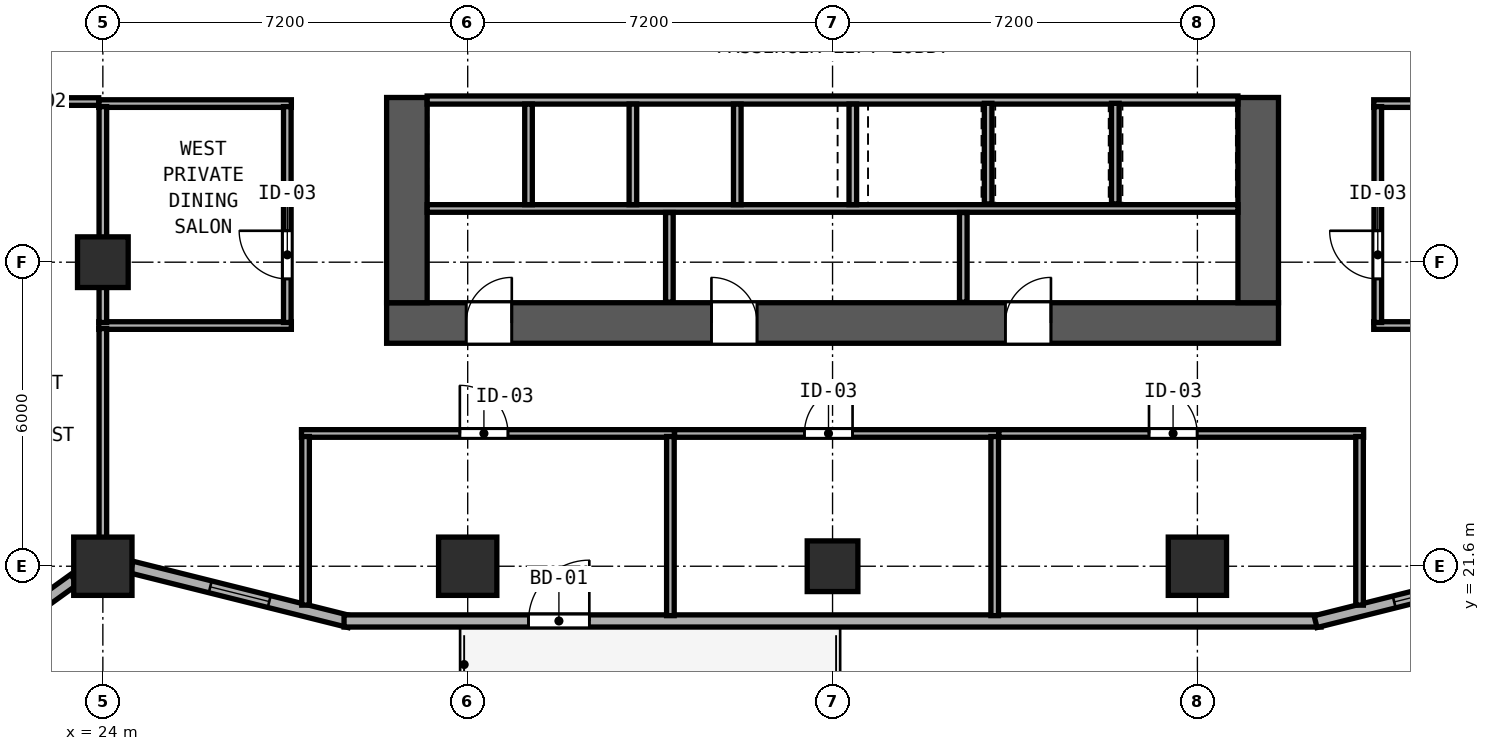
"""IFC4 building model, lengths in metres.
Left out: names, types, materials, properties, quantities, classifications, styles, units other than length and angle.
Written with IfcOpenShell. Run it as: python <this file> out.ifc"""

import sys

from ifc_helpers import new_model, si_unit, direction, frame, frame_2d, origin, origin_2d, place, context, subcontext, project, spatial, rectangle, hollow_rectangle, extrude, element, fill, save


model = new_model("IFC4")
c1 = context("Model", 3, precision=1e-05, world=origin(), true_north=direction((0.0, 1.0)))
c2 = subcontext(c1, "Body", "Model", "MODEL_VIEW")
j1 = project(units=[si_unit("LENGTHUNIT", "METRE"), si_unit("PLANEANGLEUNIT", "RADIAN")], contexts=[c1])
p1 = place(None, origin())
s1 = spatial("IfcSite", under=j1, at=p1, CompositionType="ELEMENT")
p2 = place(p1, origin())
s2 = spatial("IfcBuilding", under=s1, at=p2, CompositionType="ELEMENT")
p3 = place(p2, frame((0.0, 0.0, 78.0)))
s3 = spatial("IfcBuildingStorey", under=s2, at=p3, CompositionType="ELEMENT", Elevation=78.0)
p4 = place(p3, frame((29.6, 26.4, 0.0), z_axis=(0.0, 0.0, 1.0), x_axis=(1.0, 0.0, 0.0)))
e1 = element("IfcWall", 1, at=p4, inside=s3, PredefinedType="SHEAR", context=c2, shape_type="SweptSolid", body=[
    extrude(rectangle(XDim=17.6, YDim=0.8, at=frame_2d((8.8, 0.0))), origin(), (0.0, 0.0, 1.0), 3.6),
])
p5 = place(p4, frame((2.47, 0.0, 0.0), z_axis=(0.0, 0.0, 1.0), x_axis=(-1.0, 0.0, 0.0)))
e2 = element("IfcOpeningElement", 2, at=p5, cuts=e1, PredefinedType="OPENING", context=c2, shape_type="SweptSolid", body=[
    extrude(rectangle(XDim=0.9, YDim=2.1, at=frame_2d((0.45, 1.05))), frame((0.0, 0.41, 0.0), z_axis=(0.0, -1.0, 0.0), x_axis=(1.0, 0.0, 0.0)), (0.0, 0.0, 1.0), 0.82),
])
p6 = place(p4, frame((7.31, 0.0, 0.0), z_axis=(0.0, 0.0, 1.0), x_axis=(-1.0, 0.0, 0.0)))
e3 = element("IfcOpeningElement", 3, at=p6, cuts=e1, PredefinedType="OPENING", context=c2, shape_type="SweptSolid", body=[
    extrude(rectangle(XDim=0.9, YDim=2.1, at=frame_2d((0.45, 1.05))), frame((0.0, 0.41, 0.0), z_axis=(0.0, -1.0, 0.0), x_axis=(1.0, 0.0, 0.0)), (0.0, 0.0, 1.0), 0.82),
])
p7 = place(p4, frame((13.11, 0.0, 0.0), z_axis=(0.0, 0.0, 1.0), x_axis=(-1.0, 0.0, 0.0)))
e4 = element("IfcOpeningElement", 4, at=p7, cuts=e1, PredefinedType="OPENING", context=c2, shape_type="SweptSolid", body=[
    extrude(rectangle(XDim=0.9, YDim=2.1, at=frame_2d((0.45, 1.05))), frame((0.0, 0.41, 0.0), z_axis=(0.0, -1.0, 0.0), x_axis=(1.0, 0.0, 0.0)), (0.0, 0.0, 1.0), 0.82),
])
for number, where, z_axis, x_axis in (
    (5, (30.0, 26.8, 0.0), (0.0, 0.0, 1.0), (0.0, 1.0, 0.0)),
    (6, (46.8, 26.8, 0.0), (0.0, 0.0, 1.0), (0.0, 1.0, 0.0)),
):
    element("IfcWall", number, at=place(p3, frame(where, z_axis=z_axis, x_axis=x_axis)), inside=s3, PredefinedType="SHEAR", context=c2, shape_type="SweptSolid", body=[
        extrude(rectangle(XDim=4.05, YDim=0.8, at=frame_2d((2.025, 0.0))), origin(), (0.0, 0.0, 1.0), 3.6),
    ])
for number, where, z_axis, x_axis in (
    (7, (24.0, 21.6, 0.0), (0.0, 0.0, 1.0), (1.0, 0.0, 0.0)),
    (8, (31.2, 21.6, 0.0), (0.0, 0.0, 1.0), (1.0, 0.0, 0.0)),
    (9, (45.6, 21.6, 0.0), (0.0, 0.0, 1.0), (1.0, 0.0, 0.0)),
):
    element("IfcColumn", number, at=place(p3, frame(where, z_axis=z_axis, x_axis=x_axis)), inside=s3, PredefinedType="COLUMN", context=c2, shape_type="SweptSolid", body=[
        extrude(hollow_rectangle(XDim=1.15, YDim=1.15, WallThickness=0.042, at=origin_2d()), origin(), (0.0, 0.0, 1.0), 3.8),
    ])
for number, where, z_axis, x_axis in (
    (10, (24.0, 27.6, 0.0), (0.0, 0.0, 1.0), (1.0, 0.0, 0.0)),
    (11, (38.4, 21.6, 0.0), (0.0, 0.0, 1.0), (1.0, 0.0, 0.0)),
):
    element("IfcColumn", number, at=place(p3, frame(where, z_axis=z_axis, x_axis=x_axis)), inside=s3, PredefinedType="COLUMN", context=c2, shape_type="SweptSolid", body=[
        extrude(hollow_rectangle(XDim=1.0, YDim=1.0, WallThickness=0.038, at=origin_2d()), origin(), (0.0, 0.0, 1.0), 3.8),
    ])
p8 = place(p3, frame((14.075, 14.602, 0.0), z_axis=(0.0, 0.0, 1.0), x_axis=(0.811543176492, 0.58429245476, 0.0)))
e12 = element("IfcWall", 12, at=p8, inside=s3, PredefinedType="SOLIDWALL", context=c2, shape_type="SweptSolid", body=[
    extrude(rectangle(XDim=11.531, YDim=0.24, at=frame_2d((5.765, 0.0))), origin(), (0.0, 0.0, 1.0), 3.097),
])
p9 = place(p8, frame((1.246, 0.0, 0.85)))
e13 = element("IfcOpeningElement", 13, at=p9, cuts=e12, PredefinedType="OPENING", context=c2, shape_type="SweptSolid", body=[
    extrude(rectangle(XDim=1.2, YDim=1.85, at=frame_2d((0.6, 0.925))), frame((0.0, 0.13, 0.0), z_axis=(0.0, -1.0, 0.0), x_axis=(1.0, 0.0, 0.0)), (0.0, 0.0, 1.0), 0.26),
])
p10 = place(p8, frame((6.36, 0.0, 0.85)))
e14 = element("IfcOpeningElement", 14, at=p10, cuts=e12, PredefinedType="OPENING", context=c2, shape_type="SweptSolid", body=[
    extrude(rectangle(XDim=1.2, YDim=1.85, at=frame_2d((0.6, 0.925))), frame((0.0, 0.13, 0.0), z_axis=(0.0, -1.0, 0.0), x_axis=(1.0, 0.0, 0.0)), (0.0, 0.0, 1.0), 0.26),
])
p11 = place(p8, frame((9.07, 0.0, 0.85)))
e15 = element("IfcOpeningElement", 15, at=p11, cuts=e12, PredefinedType="OPENING", context=c2, shape_type="SweptSolid", body=[
    extrude(rectangle(XDim=1.2, YDim=1.85, at=frame_2d((0.6, 0.925))), frame((0.0, 0.13, 0.0), z_axis=(0.0, -1.0, 0.0), x_axis=(1.0, 0.0, 0.0)), (0.0, 0.0, 1.0), 0.26),
])
p12 = place(p3, frame((24.567, 21.582, 0.0), z_axis=(0.0, 0.0, 1.0), x_axis=(0.970148978127, -0.24250971164, 0.0)))
e16 = element("IfcWall", 16, at=p12, inside=s3, PredefinedType="SOLIDWALL", context=c2, shape_type="SweptSolid", body=[
    extrude(rectangle(XDim=4.434, YDim=0.24, at=frame_2d((2.217, 0.0))), origin(), (0.0, 0.0, 1.0), 3.097),
])
p13 = place(p12, frame((1.6, 0.0, 0.85)))
e17 = element("IfcOpeningElement", 17, at=p13, cuts=e16, PredefinedType="OPENING", context=c2, shape_type="SweptSolid", body=[
    extrude(rectangle(XDim=1.2, YDim=1.85, at=frame_2d((0.6, 0.925))), frame((0.0, 0.13, 0.0), z_axis=(0.0, -1.0, 0.0), x_axis=(1.0, 0.0, 0.0)), (0.0, 0.0, 1.0), 0.26),
])
p14 = place(p3, frame((28.76, 20.52, 0.0), z_axis=(0.0, 0.0, 1.0), x_axis=(1.0, 0.0, 0.0)))
e18 = element("IfcWall", 18, at=p14, inside=s3, PredefinedType="SOLIDWALL", context=c2, shape_type="SweptSolid", body=[
    extrude(rectangle(XDim=19.281, YDim=0.24, at=frame_2d((9.64, 0.0))), origin(), (0.0, 0.0, 1.0), 3.6),
])
p15 = place(p14, frame((4.84, 0.0, 0.0), z_axis=(0.0, 0.0, 1.0), x_axis=(-1.0, 0.0, 0.0)))
e19 = element("IfcOpeningElement", 19, at=p15, cuts=e18, PredefinedType="OPENING", context=c2, shape_type="SweptSolid", body=[
    extrude(rectangle(XDim=1.2, YDim=2.15, at=frame_2d((0.6, 1.075))), frame((0.0, 0.13, 0.0), z_axis=(0.0, -1.0, 0.0), x_axis=(1.0, 0.0, 0.0)), (0.0, 0.0, 1.0), 0.26),
])
p16 = place(p3, frame((47.932, 20.507, 0.0), z_axis=(0.0, 0.0, 1.0), x_axis=(0.970145739396, 0.242522667667, 0.0)))
e20 = element("IfcWall", 20, at=p16, inside=s3, PredefinedType="SOLIDWALL", context=c2, shape_type="SweptSolid", body=[
    extrude(rectangle(XDim=4.433, YDim=0.24, at=frame_2d((2.217, 0.0))), origin(), (0.0, 0.0, 1.0), 3.097),
])
p17 = place(p16, frame((1.6, 0.0, 0.85)))
e21 = element("IfcOpeningElement", 21, at=p17, cuts=e20, PredefinedType="OPENING", context=c2, shape_type="SweptSolid", body=[
    extrude(rectangle(XDim=1.2, YDim=1.85, at=frame_2d((0.6, 0.925))), frame((0.0, 0.13, 0.0), z_axis=(0.0, -1.0, 0.0), x_axis=(1.0, 0.0, 0.0)), (0.0, 0.0, 1.0), 0.26),
])
p18 = place(p3, frame((30.4, 30.8, 0.0), z_axis=(0.0, 0.0, 1.0), x_axis=(1.0, 0.0, 0.0)))
e22 = element("IfcWall", 22, at=p18, inside=s3, PredefinedType="SOLIDWALL", context=c2, shape_type="SweptSolid", body=[
    extrude(rectangle(XDim=16.0, YDim=0.16, at=frame_2d((8.0, 0.0))), origin(), (0.0, 0.0, 1.0), 3.6),
])
p19 = place(p3, frame((30.4, 28.66, 0.0), z_axis=(0.0, 0.0, 1.0), x_axis=(1.0, 0.0, 0.0)))
e23 = element("IfcWall", 23, at=p19, inside=s3, PredefinedType="PARTITIONING", context=c2, shape_type="SweptSolid", body=[
    extrude(rectangle(XDim=16.0, YDim=0.15, at=frame_2d((8.0, 0.0))), origin(), (0.0, 0.0, 1.0), 3.6),
])
for number, where, z_axis, x_axis in (
    (24, (32.4, 28.735, 0.0), (0.0, 0.0, 1.0), (0.0, 1.0, 0.0)),
    (25, (34.46, 28.735, 0.0), (0.0, 0.0, 1.0), (0.0, 1.0, 0.0)),
    (26, (36.52, 28.735, 0.0), (0.0, 0.0, 1.0), (0.0, 1.0, 0.0)),
    (27, (38.8, 28.735, 0.0), (0.0, 0.0, 1.0), (0.0, 1.0, 0.0)),
):
    element("IfcWall", number, at=place(p3, frame(where, z_axis=z_axis, x_axis=x_axis)), inside=s3, PredefinedType="SOLIDWALL", context=c2, shape_type="SweptSolid", body=[
        extrude(rectangle(XDim=1.985, YDim=0.15, at=frame_2d((0.992, 0.0))), origin(), (0.0, 0.0, 1.0), 3.6),
    ])
for number, where, z_axis, x_axis in (
    (28, (35.18, 26.81, 0.0), (0.0, 0.0, 1.0), (0.0, 1.0, 0.0)),
    (29, (40.98, 26.81, 0.0), (0.0, 0.0, 1.0), (0.0, 1.0, 0.0)),
):
    element("IfcWall", number, at=place(p3, frame(where, z_axis=z_axis, x_axis=x_axis)), inside=s3, PredefinedType="PARTITIONING", context=c2, shape_type="SweptSolid", body=[
        extrude(rectangle(XDim=1.77, YDim=0.15, at=frame_2d((0.885, 0.0))), origin(), (0.0, 0.0, 1.0), 3.6),
    ])
for number, where, z_axis, x_axis in (
    (30, (41.47, 28.75, 0.0), (0.0, 0.0, 1.0), (0.0, 1.0, 0.0)),
    (31, (43.98, 28.75, 0.0), (0.0, 0.0, 1.0), (0.0, 1.0, 0.0)),
):
    element("IfcWall", number, at=place(p3, frame(where, z_axis=z_axis, x_axis=x_axis)), inside=s3, PredefinedType="SOLIDWALL", context=c2, shape_type="SweptSolid", body=[
        extrude(rectangle(XDim=1.985, YDim=0.15, at=frame_2d((0.993, 0.0))), origin(), (0.0, 0.0, 1.0), 3.6),
    ])
for number, where, z_axis, x_axis in (
    (32, (23.92, 30.73, 0.0), (0.0, 0.0, 1.0), (1.0, 0.0, 0.0)),
    (33, (23.92, 26.35, 0.0), (0.0, 0.0, 1.0), (1.0, 0.0, 0.0)),
):
    element("IfcWall", number, at=place(p3, frame(where, z_axis=z_axis, x_axis=x_axis)), inside=s3, PredefinedType="PARTITIONING", context=c2, shape_type="SweptSolid", body=[
        extrude(rectangle(XDim=3.8, YDim=0.15, at=frame_2d((1.9, 0.0))), origin(), (0.0, 0.0, 1.0), 3.6),
    ])
p20 = place(p3, frame((24.0, 26.41, 0.0), z_axis=(0.0, 0.0, 1.0), x_axis=(0.0, 1.0, 0.0)))
e34 = element("IfcWall", 34, at=p20, inside=s3, PredefinedType="PARTITIONING", context=c2, shape_type="SweptSolid", body=[
    extrude(rectangle(XDim=4.26, YDim=0.15, at=frame_2d((2.13, 0.0))), origin(), (0.0, 0.0, 1.0), 3.097),
])
p21 = place(p3, frame((27.64, 26.41, 0.0), z_axis=(0.0, 0.0, 1.0), x_axis=(0.0, 1.0, 0.0)))
e35 = element("IfcWall", 35, at=p21, inside=s3, PredefinedType="PARTITIONING", context=c2, shape_type="SweptSolid", body=[
    extrude(rectangle(XDim=4.26, YDim=0.15, at=frame_2d((2.13, 0.0))), origin(), (0.0, 0.0, 1.0), 3.6),
])
p22 = place(p21, frame((1.81, 0.0, 0.0), z_axis=(0.0, 0.0, 1.0), x_axis=(-1.0, 0.0, 0.0)))
e36 = element("IfcOpeningElement", 36, at=p22, cuts=e35, PredefinedType="OPENING", context=c2, shape_type="SweptSolid", body=[
    extrude(rectangle(XDim=0.95, YDim=2.12, at=frame_2d((0.475, 1.06))), frame((0.0, 0.085, 0.0), z_axis=(0.0, -1.0, 0.0), x_axis=(1.0, 0.0, 0.0)), (0.0, 0.0, 1.0), 0.17),
])
for number, where, z_axis, x_axis in (
    (37, (49.08, 30.73, 0.0), (0.0, 0.0, 1.0), (1.0, 0.0, 0.0)),
    (38, (49.08, 26.35, 0.0), (0.0, 0.0, 1.0), (1.0, 0.0, 0.0)),
):
    element("IfcWall", number, at=place(p3, frame(where, z_axis=z_axis, x_axis=x_axis)), inside=s3, PredefinedType="PARTITIONING", context=c2, shape_type="SweptSolid", body=[
        extrude(rectangle(XDim=3.8, YDim=0.15, at=frame_2d((1.9, 0.0))), origin(), (0.0, 0.0, 1.0), 3.6),
    ])
p23 = place(p3, frame((49.16, 26.41, 0.0), z_axis=(0.0, 0.0, 1.0), x_axis=(0.0, 1.0, 0.0)))
e39 = element("IfcWall", 39, at=p23, inside=s3, PredefinedType="PARTITIONING", context=c2, shape_type="SweptSolid", body=[
    extrude(rectangle(XDim=4.26, YDim=0.15, at=frame_2d((2.13, 0.0))), origin(), (0.0, 0.0, 1.0), 3.6),
])
p24 = place(p23, frame((0.86, 0.0, 0.0)))
e40 = element("IfcOpeningElement", 40, at=p24, cuts=e39, PredefinedType="OPENING", context=c2, shape_type="SweptSolid", body=[
    extrude(rectangle(XDim=0.95, YDim=2.12, at=frame_2d((0.475, 1.06))), frame((0.0, 0.085, 0.0), z_axis=(0.0, -1.0, 0.0), x_axis=(1.0, 0.0, 0.0)), (0.0, 0.0, 1.0), 0.17),
])
p25 = place(p3, frame((27.92, 24.22, 0.0), z_axis=(0.0, 0.0, 1.0), x_axis=(1.0, 0.0, 0.0)))
e41 = element("IfcWall", 41, at=p25, inside=s3, PredefinedType="PARTITIONING", context=c2, shape_type="SweptSolid", body=[
    extrude(rectangle(XDim=7.36, YDim=0.15, at=frame_2d((3.68, 0.0))), origin(), (0.0, 0.0, 1.0), 3.6),
])
p26 = place(p25, frame((4.075, 0.0, 0.0), z_axis=(0.0, 0.0, 1.0), x_axis=(-1.0, 0.0, 0.0)))
e42 = element("IfcOpeningElement", 42, at=p26, cuts=e41, PredefinedType="OPENING", context=c2, shape_type="SweptSolid", body=[
    extrude(rectangle(XDim=0.95, YDim=2.12, at=frame_2d((0.475, 1.06))), frame((0.0, 0.085, 0.0), z_axis=(0.0, -1.0, 0.0), x_axis=(1.0, 0.0, 0.0)), (0.0, 0.0, 1.0), 0.17),
])
p27 = place(p3, frame((28.0, 20.832, 0.0), z_axis=(0.0, 0.0, 1.0), x_axis=(0.0, 1.0, 0.0)))
e43 = element("IfcWall", 43, at=p27, inside=s3, PredefinedType="PARTITIONING", context=c2, shape_type="SweptSolid", body=[
    extrude(rectangle(XDim=3.328, YDim=0.15, at=frame_2d((1.664, 0.0))), origin(), (0.0, 0.0, 1.0), 3.6),
])
p28 = place(p3, frame((35.2, 20.625, 0.0), z_axis=(0.0, 0.0, 1.0), x_axis=(0.0, 1.0, 0.0)))
e44 = element("IfcWall", 44, at=p28, inside=s3, PredefinedType="PARTITIONING", context=c2, shape_type="SweptSolid", body=[
    extrude(rectangle(XDim=3.535, YDim=0.15, at=frame_2d((1.768, 0.0))), origin(), (0.0, 0.0, 1.0), 3.6),
])
p29 = place(p3, frame((35.282, 24.22, 0.0), z_axis=(0.0, 0.0, 1.0), x_axis=(1.0, 0.0, 0.0)))
e45 = element("IfcWall", 45, at=p29, inside=s3, PredefinedType="PARTITIONING", context=c2, shape_type="SweptSolid", body=[
    extrude(rectangle(XDim=6.398, YDim=0.15, at=frame_2d((3.199, 0.0))), origin(), (0.0, 0.0, 1.0), 3.6),
])
p30 = place(p29, frame((3.513, 0.0, 0.0), z_axis=(0.0, 0.0, 1.0), x_axis=(-1.0, 0.0, 0.0)))
e46 = element("IfcOpeningElement", 46, at=p30, cuts=e45, PredefinedType="OPENING", context=c2, shape_type="SweptSolid", body=[
    extrude(rectangle(XDim=0.95, YDim=2.12, at=frame_2d((0.475, 1.06))), frame((0.0, 0.085, 0.0), z_axis=(0.0, -1.0, 0.0), x_axis=(1.0, 0.0, 0.0)), (0.0, 0.0, 1.0), 0.17),
])
p31 = place(p3, frame((41.6, 20.625, 0.0), z_axis=(0.0, 0.0, 1.0), x_axis=(0.0, 1.0, 0.0)))
e47 = element("IfcWall", 47, at=p31, inside=s3, PredefinedType="PARTITIONING", context=c2, shape_type="SweptSolid", body=[
    extrude(rectangle(XDim=3.535, YDim=0.15, at=frame_2d((1.768, 0.0))), origin(), (0.0, 0.0, 1.0), 3.6),
])
p32 = place(p3, frame((41.682, 24.22, 0.0), z_axis=(0.0, 0.0, 1.0), x_axis=(1.0, 0.0, 0.0)))
e48 = element("IfcWall", 48, at=p32, inside=s3, PredefinedType="PARTITIONING", context=c2, shape_type="SweptSolid", body=[
    extrude(rectangle(XDim=7.198, YDim=0.15, at=frame_2d((3.599, 0.0))), origin(), (0.0, 0.0, 1.0), 3.6),
])
p33 = place(p32, frame((3.913, 0.0, 0.0), z_axis=(0.0, 0.0, 1.0), x_axis=(-1.0, 0.0, 0.0)))
e49 = element("IfcOpeningElement", 49, at=p33, cuts=e48, PredefinedType="OPENING", context=c2, shape_type="SweptSolid", body=[
    extrude(rectangle(XDim=0.95, YDim=2.12, at=frame_2d((0.475, 1.06))), frame((0.0, 0.085, 0.0), z_axis=(0.0, -1.0, 0.0), x_axis=(1.0, 0.0, 0.0)), (0.0, 0.0, 1.0), 0.17),
])
p34 = place(p3, frame((48.8, 20.832, 0.0), z_axis=(0.0, 0.0, 1.0), x_axis=(0.0, 1.0, 0.0)))
e50 = element("IfcWall", 50, at=p34, inside=s3, PredefinedType="PARTITIONING", context=c2, shape_type="SweptSolid", body=[
    extrude(rectangle(XDim=3.328, YDim=0.15, at=frame_2d((1.664, 0.0))), origin(), (0.0, 0.0, 1.0), 3.6),
])
p35 = place(p3, frame((20.442, 30.77, 0.0), z_axis=(0.0, 0.0, 1.0), x_axis=(1.0, 0.0, 0.0)))
e51 = element("IfcWall", 51, at=p35, inside=s3, PredefinedType="PARTITIONING", context=c2, shape_type="SweptSolid", body=[
    extrude(rectangle(XDim=3.476, YDim=0.15, at=frame_2d((1.738, 0.0))), origin(), (0.0, 0.0, 1.0), 3.6),
])
p36 = place(p35, frame((1.09, 0.0, 0.0), z_axis=(0.0, 0.0, 1.0), x_axis=(-1.0, 0.0, 0.0)))
e52 = element("IfcOpeningElement", 52, at=p36, cuts=e51, PredefinedType="OPENING", context=c2, shape_type="SweptSolid", body=[
    extrude(rectangle(XDim=0.95, YDim=2.15, at=frame_2d((0.475, 1.075))), frame((0.0, 0.085, 0.0), z_axis=(0.0, -1.0, 0.0), x_axis=(1.0, 0.0, 0.0)), (0.0, 0.0, 1.0), 0.17),
])
p37 = place(p3, frame((24.0, 21.819, 0.0), z_axis=(0.0, 0.0, 1.0), x_axis=(0.0, 1.0, 0.0)))
e53 = element("IfcWall", 53, at=p37, inside=s3, PredefinedType="PARTITIONING", context=c2, shape_type="SweptSolid", body=[
    extrude(rectangle(XDim=4.471, YDim=0.15, at=frame_2d((2.236, 0.0))), origin(), (0.0, 0.0, 1.0), 3.097),
])
p38 = place(p13, origin())
e54 = element("IfcWindow", 54, at=p38, inside=s3, PartitioningType="SINGLE_PANEL", PredefinedType="WINDOW", context=c2, shape_type="SweptSolid", body=[
    extrude(rectangle(XDim=1.2, YDim=1.85, at=frame_2d((0.6, 0.925))), frame((0.0, 0.03, 0.0), z_axis=(0.0, -1.0, 0.0), x_axis=(1.0, 0.0, 0.0)), (0.0, 0.0, 1.0), 0.06),
])
fill(e17, e54)
p39 = place(p17, origin())
e55 = element("IfcWindow", 55, at=p39, inside=s3, PartitioningType="SINGLE_PANEL", PredefinedType="WINDOW", context=c2, shape_type="SweptSolid", body=[
    extrude(rectangle(XDim=1.2, YDim=1.85, at=frame_2d((0.6, 0.925))), frame((0.0, 0.03, 0.0), z_axis=(0.0, -1.0, 0.0), x_axis=(1.0, 0.0, 0.0)), (0.0, 0.0, 1.0), 0.06),
])
fill(e21, e55)
p40 = place(p15, origin())
e56 = element("IfcDoor", 56, at=p40, inside=s3, OperationType="SINGLE_SWING_LEFT", PredefinedType="DOOR", context=c2, shape_type="SweptSolid", body=[
    extrude(rectangle(XDim=1.2, YDim=2.15, at=frame_2d((0.6, 1.075))), frame((0.0, 0.025, 0.0), z_axis=(0.0, -1.0, 0.0), x_axis=(1.0, 0.0, 0.0)), (0.0, 0.0, 1.0), 0.05),
])
fill(e19, e56)
p41 = place(p5, origin())
e57 = element("IfcDoor", 57, at=p41, inside=s3, OperationType="SINGLE_SWING_LEFT", PredefinedType="DOOR", context=c2, shape_type="SweptSolid", body=[
    extrude(rectangle(XDim=0.9, YDim=2.1, at=frame_2d((0.45, 1.05))), frame((0.0, -0.195, 0.0), z_axis=(0.0, -1.0, 0.0), x_axis=(1.0, 0.0, 0.0)), (0.0, 0.0, 1.0), 0.05),
])
fill(e2, e57)
p42 = place(p6, origin())
e58 = element("IfcDoor", 58, at=p42, inside=s3, OperationType="SINGLE_SWING_RIGHT", PredefinedType="DOOR", context=c2, shape_type="SweptSolid", body=[
    extrude(rectangle(XDim=0.9, YDim=2.1, at=frame_2d((0.45, 1.05))), frame((0.0, -0.195, 0.0), z_axis=(0.0, -1.0, 0.0), x_axis=(1.0, 0.0, 0.0)), (0.0, 0.0, 1.0), 0.05),
])
fill(e3, e58)
p43 = place(p7, origin())
e59 = element("IfcDoor", 59, at=p43, inside=s3, OperationType="SINGLE_SWING_LEFT", PredefinedType="DOOR", context=c2, shape_type="SweptSolid", body=[
    extrude(rectangle(XDim=0.9, YDim=2.1, at=frame_2d((0.45, 1.05))), frame((0.0, -0.195, 0.0), z_axis=(0.0, -1.0, 0.0), x_axis=(1.0, 0.0, 0.0)), (0.0, 0.0, 1.0), 0.05),
])
fill(e4, e59)
p44 = place(p22, origin())
e60 = element("IfcDoor", 60, at=p44, inside=s3, OperationType="SINGLE_SWING_LEFT", PredefinedType="DOOR", context=c2, shape_type="SweptSolid", body=[
    extrude(rectangle(XDim=0.95, YDim=2.12, at=frame_2d((0.475, 1.06))), frame((0.0, 0.025, 0.0), z_axis=(0.0, -1.0, 0.0), x_axis=(1.0, 0.0, 0.0)), (0.0, 0.0, 1.0), 0.05),
])
fill(e36, e60)
p45 = place(p24, origin())
e61 = element("IfcDoor", 61, at=p45, inside=s3, OperationType="SINGLE_SWING_RIGHT", PredefinedType="DOOR", context=c2, shape_type="SweptSolid", body=[
    extrude(rectangle(XDim=0.95, YDim=2.12, at=frame_2d((0.475, 1.06))), frame((0.0, 0.025, 0.0), z_axis=(0.0, -1.0, 0.0), x_axis=(1.0, 0.0, 0.0)), (0.0, 0.0, 1.0), 0.05),
])
fill(e40, e61)
p46 = place(p26, origin())
e62 = element("IfcDoor", 62, at=p46, inside=s3, OperationType="SINGLE_SWING_RIGHT", PredefinedType="DOOR", context=c2, shape_type="SweptSolid", body=[
    extrude(rectangle(XDim=0.95, YDim=2.12, at=frame_2d((0.475, 1.06))), frame((0.0, 0.025, 0.0), z_axis=(0.0, -1.0, 0.0), x_axis=(1.0, 0.0, 0.0)), (0.0, 0.0, 1.0), 0.05),
])
fill(e42, e62)
p47 = place(p30, origin())
e63 = element("IfcDoor", 63, at=p47, inside=s3, OperationType="SINGLE_SWING_LEFT", PredefinedType="DOOR", context=c2, shape_type="SweptSolid", body=[
    extrude(rectangle(XDim=0.95, YDim=2.12, at=frame_2d((0.475, 1.06))), frame((0.0, 0.025, 0.0), z_axis=(0.0, -1.0, 0.0), x_axis=(1.0, 0.0, 0.0)), (0.0, 0.0, 1.0), 0.05),
])
fill(e46, e63)
p48 = place(p33, origin())
e64 = element("IfcDoor", 64, at=p48, inside=s3, OperationType="SINGLE_SWING_RIGHT", PredefinedType="DOOR", context=c2, shape_type="SweptSolid", body=[
    extrude(rectangle(XDim=0.95, YDim=2.12, at=frame_2d((0.475, 1.06))), frame((0.0, 0.025, 0.0), z_axis=(0.0, -1.0, 0.0), x_axis=(1.0, 0.0, 0.0)), (0.0, 0.0, 1.0), 0.05),
])
fill(e49, e64)
save(model, sys.argv[1])
